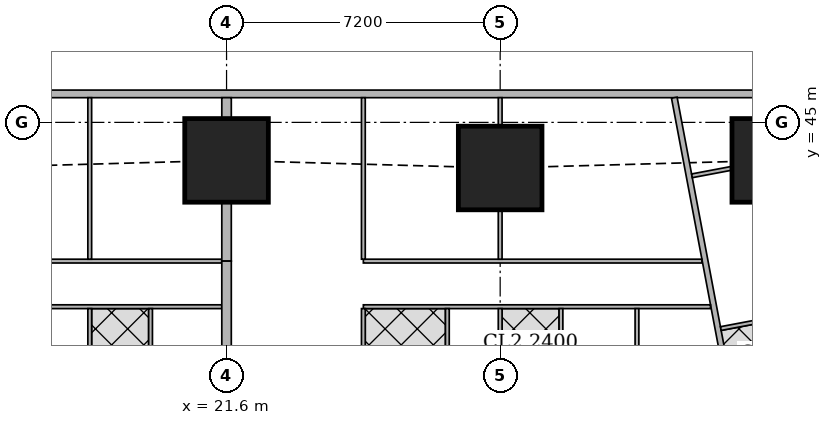
"""IFC4 building model, lengths in metres.
Left out: names, types, materials, properties, quantities, classifications, styles, units other than length and angle.
Written with IfcOpenShell. Run it as: python <this file> out.ifc"""

import sys

from ifc_helpers import new_model, si_unit, direction, frame, frame_2d, origin, origin_2d, place, context, subcontext, project, spatial, rectangle, extrude, element, fill, save


model = new_model("IFC4")
c1 = context("Model", 3, precision=1e-05, world=origin(), true_north=direction((0.0, 1.0)))
c2 = subcontext(c1, "Body", "Model", "MODEL_VIEW")
j1 = project(units=[si_unit("LENGTHUNIT", "METRE"), si_unit("PLANEANGLEUNIT", "RADIAN")], contexts=[c1])
p1 = place(None, origin())
s1 = spatial("IfcSite", under=j1, at=p1, CompositionType="ELEMENT")
p2 = place(p1, origin())
s2 = spatial("IfcBuilding", under=s1, at=p2, CompositionType="ELEMENT")
p3 = place(p2, frame((0.0, 0.0, 100.4)))
s3 = spatial("IfcBuildingStorey", under=s2, at=p3, CompositionType="ELEMENT", Elevation=100.4)
for number, where, z_axis, x_axis in (
    (1, (21.6, 44.0, 0.0), (0.0, 0.0, 1.0), (1.0, 0.0, 0.0)),
    (2, (28.8, 43.8, 0.0), (0.0, 0.0, 1.0), (1.0, 0.0, 0.0)),
    (3, (36.0, 44.0, 0.0), (0.0, 0.0, 1.0), (1.0, 0.0, 0.0)),
):
    element("IfcColumn", number, at=place(p3, frame(where, z_axis=z_axis, x_axis=x_axis)), inside=s3, PredefinedType="COLUMN", context=c2, shape_type="SweptSolid", body=[
        extrude(rectangle(XDim=2.2, YDim=2.2, at=origin_2d()), origin(), (0.0, 0.0, 1.0), 3.75),
    ])
p4 = place(p3, frame((40.106, 45.75, 0.0), z_axis=(0.0, 0.0, 1.0), x_axis=(-1.0, 0.0, 0.0)))
e4 = element("IfcWall", 4, at=p4, inside=s3, PredefinedType="SOLIDWALL", context=c2, shape_type="SweptSolid", body=[
    extrude(rectangle(XDim=37.943, YDim=0.2, at=frame_2d((18.971, 0.0))), origin(), (0.0, 0.0, 1.0), 3.5),
])
p5 = place(p4, frame((8.606, 0.0, 0.9)))
e5 = element("IfcOpeningElement", 5, at=p5, cuts=e4, PredefinedType="OPENING", context=c2, shape_type="SweptSolid", body=[
    extrude(rectangle(XDim=1.8, YDim=1.5, at=frame_2d((0.9, 0.75))), frame((0.0, 0.11, 0.0), z_axis=(0.0, -1.0, 0.0), x_axis=(1.0, 0.0, 0.0)), (0.0, 0.0, 1.0), 0.22),
])
p6 = place(p4, frame((12.206, 0.0, 0.9)))
e6 = element("IfcOpeningElement", 6, at=p6, cuts=e4, PredefinedType="OPENING", context=c2, shape_type="SweptSolid", body=[
    extrude(rectangle(XDim=1.8, YDim=1.5, at=frame_2d((0.9, 0.75))), frame((0.0, 0.11, 0.0), z_axis=(0.0, -1.0, 0.0), x_axis=(1.0, 0.0, 0.0)), (0.0, 0.0, 1.0), 0.22),
])
p7 = place(p4, frame((15.806, 0.0, 0.9)))
e7 = element("IfcOpeningElement", 7, at=p7, cuts=e4, PredefinedType="OPENING", context=c2, shape_type="SweptSolid", body=[
    extrude(rectangle(XDim=1.8, YDim=1.5, at=frame_2d((0.9, 0.75))), frame((0.0, 0.11, 0.0), z_axis=(0.0, -1.0, 0.0), x_axis=(1.0, 0.0, 0.0)), (0.0, 0.0, 1.0), 0.22),
])
p8 = place(p4, frame((19.406, 0.0, 0.9)))
e8 = element("IfcOpeningElement", 8, at=p8, cuts=e4, PredefinedType="OPENING", context=c2, shape_type="SweptSolid", body=[
    extrude(rectangle(XDim=1.8, YDim=1.5, at=frame_2d((0.9, 0.75))), frame((0.0, 0.11, 0.0), z_axis=(0.0, -1.0, 0.0), x_axis=(1.0, 0.0, 0.0)), (0.0, 0.0, 1.0), 0.22),
])
p9 = place(p4, frame((23.006, 0.0, 0.9)))
e9 = element("IfcOpeningElement", 9, at=p9, cuts=e4, PredefinedType="OPENING", context=c2, shape_type="SweptSolid", body=[
    extrude(rectangle(XDim=1.8, YDim=1.5, at=frame_2d((0.9, 0.75))), frame((0.0, 0.11, 0.0), z_axis=(0.0, -1.0, 0.0), x_axis=(1.0, 0.0, 0.0)), (0.0, 0.0, 1.0), 0.22),
])
p10 = place(p4, frame((26.606, 0.0, 0.9)))
e10 = element("IfcOpeningElement", 10, at=p10, cuts=e4, PredefinedType="OPENING", context=c2, shape_type="SweptSolid", body=[
    extrude(rectangle(XDim=1.8, YDim=1.5, at=frame_2d((0.9, 0.75))), frame((0.0, 0.11, 0.0), z_axis=(0.0, -1.0, 0.0), x_axis=(1.0, 0.0, 0.0)), (0.0, 0.0, 1.0), 0.22),
])
p11 = place(p3, frame((33.382, 45.65, 0.0), z_axis=(0.0, 0.0, 1.0), x_axis=(0.185593544777, -0.982626600565, 0.0)))
e11 = element("IfcWall", 11, at=p11, inside=s3, PredefinedType="SOLIDWALL", context=c2, shape_type="SweptSolid", body=[
    extrude(rectangle(XDim=47.118, YDim=0.15, at=frame_2d((23.559, 0.0))), origin(), (0.0, 0.0, 1.0), 2.2),
])
p12 = place(p11, frame((10.662, 0.0, 0.0)))
e12 = element("IfcOpeningElement", 12, at=p12, cuts=e11, PredefinedType="OPENING", context=c2, shape_type="SweptSolid", body=[
    extrude(rectangle(XDim=1.0, YDim=2.1, at=frame_2d((0.5, 1.05))), frame((0.0, 0.085, 0.0), z_axis=(0.0, -1.0, 0.0), x_axis=(1.0, 0.0, 0.0)), (0.0, 0.0, 1.0), 0.17),
])
p13 = place(p11, frame((15.237, 0.0, 0.0)))
e13 = element("IfcOpeningElement", 13, at=p13, cuts=e11, PredefinedType="OPENING", context=c2, shape_type="SweptSolid", body=[
    extrude(rectangle(XDim=1.0, YDim=2.1, at=frame_2d((0.5, 1.05))), frame((0.0, 0.085, 0.0), z_axis=(0.0, -1.0, 0.0), x_axis=(1.0, 0.0, 0.0)), (0.0, 0.0, 1.0), 0.17),
])
p14 = place(p11, frame((27.341, 0.0, 0.0)))
e14 = element("IfcOpeningElement", 14, at=p14, cuts=e11, PredefinedType="OPENING", context=c2, shape_type="SweptSolid", body=[
    extrude(rectangle(XDim=1.0, YDim=2.1, at=frame_2d((0.5, 1.05))), frame((0.0, 0.085, 0.0), z_axis=(0.0, -1.0, 0.0), x_axis=(1.0, 0.0, 0.0)), (0.0, 0.0, 1.0), 0.17),
])
p15 = place(p11, frame((33.833, 0.0, 0.0)))
e15 = element("IfcOpeningElement", 15, at=p15, cuts=e11, PredefinedType="OPENING", context=c2, shape_type="SweptSolid", body=[
    extrude(rectangle(XDim=1.0, YDim=2.1, at=frame_2d((0.5, 1.05))), frame((0.0, 0.085, 0.0), z_axis=(0.0, -1.0, 0.0), x_axis=(1.0, 0.0, 0.0)), (0.0, 0.0, 1.0), 0.17),
])
p16 = place(p3, frame((34.89, 43.791, 0.0), z_axis=(0.0, 0.0, 1.0), x_axis=(-0.982621304855, -0.185621580763, 0.0)))
e16 = element("IfcWall", 16, at=p16, inside=s3, PredefinedType="PARTITIONING", context=c2, shape_type="SweptSolid", body=[
    extrude(rectangle(XDim=1.062, YDim=0.1, at=frame_2d((0.531, 0.0))), origin(), (0.0, 0.0, 1.0), 2.05),
])
p17 = place(p3, frame((37.823, 40.182, 0.0), z_axis=(0.0, 0.0, 1.0), x_axis=(-0.982664729897, -0.18539155487, 0.0)))
e17 = element("IfcWall", 17, at=p17, inside=s3, PredefinedType="PARTITIONING", context=c2, shape_type="SweptSolid", body=[
    extrude(rectangle(XDim=3.274, YDim=0.1, at=frame_2d((1.637, 0.0))), origin(), (0.0, 0.0, 1.0), 3.5),
])
p18 = place(p3, frame((14.4, 41.35, 0.0), z_axis=(0.0, 0.0, 1.0), x_axis=(1.0, 0.0, 0.0)))
e18 = element("IfcWall", 18, at=p18, inside=s3, PredefinedType="PARTITIONING", context=c2, shape_type="SweptSolid", body=[
    extrude(rectangle(XDim=7.075, YDim=0.1, at=frame_2d((3.538, 0.0))), origin(), (0.0, 0.0, 1.0), 3.5),
])
p19 = place(p18, frame((0.2, 0.0, 0.0)))
e19 = element("IfcOpeningElement", 19, at=p19, cuts=e18, PredefinedType="OPENING", context=c2, shape_type="SweptSolid", body=[
    extrude(rectangle(XDim=0.9, YDim=2.1, at=frame_2d((0.45, 1.05))), frame((0.0, 0.06, 0.0), z_axis=(0.0, -1.0, 0.0), x_axis=(1.0, 0.0, 0.0)), (0.0, 0.0, 1.0), 0.12),
])
p20 = place(p18, frame((3.8, 0.0, 0.0)))
e20 = element("IfcOpeningElement", 20, at=p20, cuts=e18, PredefinedType="OPENING", context=c2, shape_type="SweptSolid", body=[
    extrude(rectangle(XDim=0.9, YDim=2.1, at=frame_2d((0.45, 1.05))), frame((0.0, 0.06, 0.0), z_axis=(0.0, -1.0, 0.0), x_axis=(1.0, 0.0, 0.0)), (0.0, 0.0, 1.0), 0.12),
])
p21 = place(p3, frame((14.4, 40.15, 0.0), z_axis=(0.0, 0.0, 1.0), x_axis=(1.0, 0.0, 0.0)))
e21 = element("IfcWall", 21, at=p21, inside=s3, PredefinedType="PARTITIONING", context=c2, shape_type="SweptSolid", body=[
    extrude(rectangle(XDim=7.075, YDim=0.1, at=frame_2d((3.538, 0.0))), origin(), (0.0, 0.0, 1.0), 3.5),
])
p22 = place(p21, frame((0.655, 0.0, 0.0)))
e22 = element("IfcOpeningElement", 22, at=p22, cuts=e21, PredefinedType="OPENING", context=c2, shape_type="SweptSolid", body=[
    extrude(rectangle(XDim=0.9, YDim=2.1, at=frame_2d((0.45, 1.05))), frame((0.0, 0.06, 0.0), z_axis=(0.0, -1.0, 0.0), x_axis=(1.0, 0.0, 0.0)), (0.0, 0.0, 1.0), 0.12),
])
p23 = place(p21, frame((3.95, 0.0, 0.0)))
e23 = element("IfcOpeningElement", 23, at=p23, cuts=e21, PredefinedType="OPENING", context=c2, shape_type="SweptSolid", body=[
    extrude(rectangle(XDim=0.9, YDim=2.1, at=frame_2d((0.45, 1.05))), frame((0.0, 0.06, 0.0), z_axis=(0.0, -1.0, 0.0), x_axis=(1.0, 0.0, 0.0)), (0.0, 0.0, 1.0), 0.12),
])
p24 = place(p21, frame((2.455, 0.0, 0.0)))
e24 = element("IfcOpeningElement", 24, at=p24, cuts=e21, PredefinedType="OPENING", context=c2, shape_type="SweptSolid", body=[
    extrude(rectangle(XDim=0.9, YDim=2.1, at=frame_2d((0.45, 1.05))), frame((0.0, 0.06, 0.0), z_axis=(0.0, -1.0, 0.0), x_axis=(1.0, 0.0, 0.0)), (0.0, 0.0, 1.0), 0.12),
])
p25 = place(p21, frame((5.75, 0.0, 0.0)))
e25 = element("IfcOpeningElement", 25, at=p25, cuts=e21, PredefinedType="OPENING", context=c2, shape_type="SweptSolid", body=[
    extrude(rectangle(XDim=0.9, YDim=2.1, at=frame_2d((0.45, 1.05))), frame((0.0, 0.06, 0.0), z_axis=(0.0, -1.0, 0.0), x_axis=(1.0, 0.0, 0.0)), (0.0, 0.0, 1.0), 0.12),
])
p26 = place(p3, frame((18.0, 41.4, 0.0), z_axis=(0.0, 0.0, 1.0), x_axis=(0.0, 1.0, 0.0)))
e26 = element("IfcWall", 26, at=p26, inside=s3, PredefinedType="PARTITIONING", context=c2, shape_type="SweptSolid", body=[
    extrude(rectangle(XDim=4.25, YDim=0.1, at=frame_2d((2.125, 0.0))), origin(), (0.0, 0.0, 1.0), 2.2),
])
for number, where, z_axis, x_axis in (
    (27, (18.0, 36.825, 0.0), (0.0, 0.0, 1.0), (0.0, 1.0, 0.0)),
    (28, (19.6, 36.825, 0.0), (0.0, 0.0, 1.0), (0.0, 1.0, 0.0)),
):
    element("IfcWall", number, at=place(p3, frame(where, z_axis=z_axis, x_axis=x_axis)), inside=s3, PredefinedType="PARTITIONING", context=c2, shape_type="SweptSolid", body=[
        extrude(rectangle(XDim=3.275, YDim=0.1, at=frame_2d((1.638, 0.0))), origin(), (0.0, 0.0, 1.0), 3.5),
    ])
p27 = place(p3, frame((25.2, 41.35, 0.0), z_axis=(0.0, 0.0, 1.0), x_axis=(1.0, 0.0, 0.0)))
e29 = element("IfcWall", 29, at=p27, inside=s3, PredefinedType="PARTITIONING", context=c2, shape_type="SweptSolid", body=[
    extrude(rectangle(XDim=8.908, YDim=0.1, at=frame_2d((4.454, 0.0))), origin(), (0.0, 0.0, 1.0), 3.5),
])
p28 = place(p27, frame((0.2, 0.0, 0.0)))
e30 = element("IfcOpeningElement", 30, at=p28, cuts=e29, PredefinedType="OPENING", context=c2, shape_type="SweptSolid", body=[
    extrude(rectangle(XDim=0.9, YDim=2.1, at=frame_2d((0.45, 1.05))), frame((0.0, 0.06, 0.0), z_axis=(0.0, -1.0, 0.0), x_axis=(1.0, 0.0, 0.0)), (0.0, 0.0, 1.0), 0.12),
])
p29 = place(p27, frame((3.8, 0.0, 0.0)))
e31 = element("IfcOpeningElement", 31, at=p29, cuts=e29, PredefinedType="OPENING", context=c2, shape_type="SweptSolid", body=[
    extrude(rectangle(XDim=0.9, YDim=2.1, at=frame_2d((0.45, 1.05))), frame((0.0, 0.06, 0.0), z_axis=(0.0, -1.0, 0.0), x_axis=(1.0, 0.0, 0.0)), (0.0, 0.0, 1.0), 0.12),
])
p30 = place(p3, frame((25.2, 40.15, 0.0), z_axis=(0.0, 0.0, 1.0), x_axis=(1.0, 0.0, 0.0)))
e32 = element("IfcWall", 32, at=p30, inside=s3, PredefinedType="PARTITIONING", context=c2, shape_type="SweptSolid", body=[
    extrude(rectangle(XDim=9.135, YDim=0.1, at=frame_2d((4.567, 0.0))), origin(), (0.0, 0.0, 1.0), 3.5),
])
p31 = place(p30, frame((0.655, 0.0, 0.0)))
e33 = element("IfcOpeningElement", 33, at=p31, cuts=e32, PredefinedType="OPENING", context=c2, shape_type="SweptSolid", body=[
    extrude(rectangle(XDim=0.9, YDim=2.1, at=frame_2d((0.45, 1.05))), frame((0.0, 0.06, 0.0), z_axis=(0.0, -1.0, 0.0), x_axis=(1.0, 0.0, 0.0)), (0.0, 0.0, 1.0), 0.12),
])
p32 = place(p30, frame((3.95, 0.0, 0.0)))
e34 = element("IfcOpeningElement", 34, at=p32, cuts=e32, PredefinedType="OPENING", context=c2, shape_type="SweptSolid", body=[
    extrude(rectangle(XDim=0.9, YDim=2.1, at=frame_2d((0.45, 1.05))), frame((0.0, 0.06, 0.0), z_axis=(0.0, -1.0, 0.0), x_axis=(1.0, 0.0, 0.0)), (0.0, 0.0, 1.0), 0.12),
])
p33 = place(p30, frame((8.081, 0.0, 0.0)))
e35 = element("IfcOpeningElement", 35, at=p33, cuts=e32, PredefinedType="OPENING", context=c2, shape_type="SweptSolid", body=[
    extrude(rectangle(XDim=0.9, YDim=2.1, at=frame_2d((0.45, 1.05))), frame((0.0, 0.06, 0.0), z_axis=(0.0, -1.0, 0.0), x_axis=(1.0, 0.0, 0.0)), (0.0, 0.0, 1.0), 0.12),
])
p34 = place(p30, frame((2.455, 0.0, 0.0)))
e36 = element("IfcOpeningElement", 36, at=p34, cuts=e32, PredefinedType="OPENING", context=c2, shape_type="SweptSolid", body=[
    extrude(rectangle(XDim=0.9, YDim=2.1, at=frame_2d((0.45, 1.05))), frame((0.0, 0.06, 0.0), z_axis=(0.0, -1.0, 0.0), x_axis=(1.0, 0.0, 0.0)), (0.0, 0.0, 1.0), 0.12),
])
p35 = place(p30, frame((5.75, 0.0, 0.0)))
e37 = element("IfcOpeningElement", 37, at=p35, cuts=e32, PredefinedType="OPENING", context=c2, shape_type="SweptSolid", body=[
    extrude(rectangle(XDim=0.9, YDim=2.1, at=frame_2d((0.45, 1.05))), frame((0.0, 0.06, 0.0), z_axis=(0.0, -1.0, 0.0), x_axis=(1.0, 0.0, 0.0)), (0.0, 0.0, 1.0), 0.12),
])
p36 = place(p3, frame((25.2, 41.4, 0.0), z_axis=(0.0, 0.0, 1.0), x_axis=(0.0, 1.0, 0.0)))
e38 = element("IfcWall", 38, at=p36, inside=s3, PredefinedType="PARTITIONING", context=c2, shape_type="SweptSolid", body=[
    extrude(rectangle(XDim=4.25, YDim=0.1, at=frame_2d((2.125, 0.0))), origin(), (0.0, 0.0, 1.0), 2.2),
])
p37 = place(p3, frame((28.8, 41.4, 0.0), z_axis=(0.0, 0.0, 1.0), x_axis=(0.0, 1.0, 0.0)))
e39 = element("IfcWall", 39, at=p37, inside=s3, PredefinedType="PARTITIONING", context=c2, shape_type="SweptSolid", body=[
    extrude(rectangle(XDim=1.299, YDim=0.1, at=frame_2d((0.649, 0.0))), origin(), (0.0, 0.0, 1.0), 3.5),
])
p38 = place(p3, frame((28.8, 44.901, 0.0), z_axis=(0.0, 0.0, 1.0), x_axis=(0.0, 1.0, 0.0)))
e40 = element("IfcWall", 40, at=p38, inside=s3, PredefinedType="PARTITIONING", context=c2, shape_type="SweptSolid", body=[
    extrude(rectangle(XDim=0.749, YDim=0.1, at=frame_2d((0.375, 0.0))), origin(), (0.0, 0.0, 1.0), 3.5),
])
p39 = place(p3, frame((25.2, 36.825, 0.0), z_axis=(0.0, 0.0, 1.0), x_axis=(0.0, 1.0, 0.0)))
e41 = element("IfcWall", 41, at=p39, inside=s3, PredefinedType="PARTITIONING", context=c2, shape_type="SweptSolid", body=[
    extrude(rectangle(XDim=3.275, YDim=0.1, at=frame_2d((1.638, 0.0))), origin(), (0.0, 0.0, 1.0), 3.5),
])
p40 = place(p3, frame((28.8, 38.301, 0.0), z_axis=(0.0, 0.0, 1.0), x_axis=(0.0, 1.0, 0.0)))
e42 = element("IfcWall", 42, at=p40, inside=s3, PredefinedType="PARTITIONING", context=c2, shape_type="SweptSolid", body=[
    extrude(rectangle(XDim=1.799, YDim=0.1, at=frame_2d((0.899, 0.0))), origin(), (0.0, 0.0, 1.0), 3.5),
])
for number, where, z_axis, x_axis in (
    (43, (32.4, 36.825, 0.0), (0.0, 0.0, 1.0), (0.0, 1.0, 0.0)),
    (44, (27.41, 36.825, 0.0), (0.0, 0.0, 1.0), (0.0, 1.0, 0.0)),
    (45, (30.4, 36.825, 0.0), (0.0, 0.0, 1.0), (0.0, 1.0, 0.0)),
):
    element("IfcWall", number, at=place(p3, frame(where, z_axis=z_axis, x_axis=x_axis)), inside=s3, PredefinedType="PARTITIONING", context=c2, shape_type="SweptSolid", body=[
        extrude(rectangle(XDim=3.275, YDim=0.1, at=frame_2d((1.638, 0.0))), origin(), (0.0, 0.0, 1.0), 3.5),
    ])
p41 = place(p3, frame((21.6, 41.35, 0.0), z_axis=(0.0, 0.0, 1.0), x_axis=(0.0, 1.0, 0.0)))
e46 = element("IfcWall", 46, at=p41, inside=s3, PredefinedType="SOLIDWALL", context=c2, shape_type="SweptSolid", body=[
    extrude(rectangle(XDim=1.549, YDim=0.25, at=frame_2d((0.774, 0.0))), origin(), (0.0, 0.0, 1.0), 3.5),
])
p42 = place(p3, frame((21.6, 45.101, 0.0), z_axis=(0.0, 0.0, 1.0), x_axis=(0.0, 1.0, 0.0)))
e47 = element("IfcWall", 47, at=p42, inside=s3, PredefinedType="SOLIDWALL", context=c2, shape_type="SweptSolid", body=[
    extrude(rectangle(XDim=0.549, YDim=0.25, at=frame_2d((0.274, 0.0))), origin(), (0.0, 0.0, 1.0), 3.5),
])
p43 = place(p3, frame((21.6, 38.301, 0.0), z_axis=(0.0, 0.0, 1.0), x_axis=(0.0, 1.0, 0.0)))
e48 = element("IfcWall", 48, at=p43, inside=s3, PredefinedType="SOLIDWALL", context=c2, shape_type="SweptSolid", body=[
    extrude(rectangle(XDim=3.049, YDim=0.25, at=frame_2d((1.524, 0.0))), origin(), (0.0, 0.0, 1.0), 3.5),
])
p44 = place(p5, origin())
e49 = element("IfcWindow", 49, at=p44, inside=s3, PartitioningType="SINGLE_PANEL", PredefinedType="WINDOW", context=c2, shape_type="SweptSolid", body=[
    extrude(rectangle(XDim=1.8, YDim=1.5, at=frame_2d((0.9, 0.75))), frame((0.0, 0.03, 0.0), z_axis=(0.0, -1.0, 0.0), x_axis=(1.0, 0.0, 0.0)), (0.0, 0.0, 1.0), 0.06),
])
fill(e5, e49)
p45 = place(p6, origin())
e50 = element("IfcWindow", 50, at=p45, inside=s3, PartitioningType="SINGLE_PANEL", PredefinedType="WINDOW", context=c2, shape_type="SweptSolid", body=[
    extrude(rectangle(XDim=1.8, YDim=1.5, at=frame_2d((0.9, 0.75))), frame((0.0, 0.03, 0.0), z_axis=(0.0, -1.0, 0.0), x_axis=(1.0, 0.0, 0.0)), (0.0, 0.0, 1.0), 0.06),
])
fill(e6, e50)
p46 = place(p7, origin())
e51 = element("IfcWindow", 51, at=p46, inside=s3, PartitioningType="SINGLE_PANEL", PredefinedType="WINDOW", context=c2, shape_type="SweptSolid", body=[
    extrude(rectangle(XDim=1.8, YDim=1.5, at=frame_2d((0.9, 0.75))), frame((0.0, 0.03, 0.0), z_axis=(0.0, -1.0, 0.0), x_axis=(1.0, 0.0, 0.0)), (0.0, 0.0, 1.0), 0.06),
])
fill(e7, e51)
p47 = place(p8, origin())
e52 = element("IfcWindow", 52, at=p47, inside=s3, PartitioningType="SINGLE_PANEL", PredefinedType="WINDOW", context=c2, shape_type="SweptSolid", body=[
    extrude(rectangle(XDim=1.8, YDim=1.5, at=frame_2d((0.9, 0.75))), frame((0.0, 0.03, 0.0), z_axis=(0.0, -1.0, 0.0), x_axis=(1.0, 0.0, 0.0)), (0.0, 0.0, 1.0), 0.06),
])
fill(e8, e52)
p48 = place(p9, origin())
e53 = element("IfcWindow", 53, at=p48, inside=s3, PartitioningType="SINGLE_PANEL", PredefinedType="WINDOW", context=c2, shape_type="SweptSolid", body=[
    extrude(rectangle(XDim=1.8, YDim=1.5, at=frame_2d((0.9, 0.75))), frame((0.0, 0.03, 0.0), z_axis=(0.0, -1.0, 0.0), x_axis=(1.0, 0.0, 0.0)), (0.0, 0.0, 1.0), 0.06),
])
fill(e9, e53)
p49 = place(p20, origin())
e54 = element("IfcDoor", 54, at=p49, inside=s3, OperationType="SINGLE_SWING_LEFT", PredefinedType="DOOR", context=c2, shape_type="SweptSolid", body=[
    extrude(rectangle(XDim=0.9, YDim=2.1, at=frame_2d((0.45, 1.05))), frame((0.0, 0.025, 0.0), z_axis=(0.0, -1.0, 0.0), x_axis=(1.0, 0.0, 0.0)), (0.0, 0.0, 1.0), 0.05),
])
fill(e20, e54)
p50 = place(p23, origin())
e55 = element("IfcDoor", 55, at=p50, inside=s3, OperationType="SINGLE_SWING_LEFT", PredefinedType="DOOR", context=c2, shape_type="SweptSolid", body=[
    extrude(rectangle(XDim=0.9, YDim=2.1, at=frame_2d((0.45, 1.05))), frame((0.0, 0.025, 0.0), z_axis=(0.0, -1.0, 0.0), x_axis=(1.0, 0.0, 0.0)), (0.0, 0.0, 1.0), 0.05),
])
fill(e23, e55)
p51 = place(p24, origin())
e56 = element("IfcDoor", 56, at=p51, inside=s3, OperationType="SINGLE_SWING_LEFT", PredefinedType="DOOR", context=c2, shape_type="SweptSolid", body=[
    extrude(rectangle(XDim=0.9, YDim=2.1, at=frame_2d((0.45, 1.05))), frame((0.0, 0.025, 0.0), z_axis=(0.0, -1.0, 0.0), x_axis=(1.0, 0.0, 0.0)), (0.0, 0.0, 1.0), 0.05),
])
fill(e24, e56)
p52 = place(p25, origin())
e57 = element("IfcDoor", 57, at=p52, inside=s3, OperationType="SINGLE_SWING_LEFT", PredefinedType="DOOR", context=c2, shape_type="SweptSolid", body=[
    extrude(rectangle(XDim=0.9, YDim=2.1, at=frame_2d((0.45, 1.05))), frame((0.0, 0.025, 0.0), z_axis=(0.0, -1.0, 0.0), x_axis=(1.0, 0.0, 0.0)), (0.0, 0.0, 1.0), 0.05),
])
fill(e25, e57)
p53 = place(p28, origin())
e58 = element("IfcDoor", 58, at=p53, inside=s3, OperationType="SINGLE_SWING_LEFT", PredefinedType="DOOR", context=c2, shape_type="SweptSolid", body=[
    extrude(rectangle(XDim=0.9, YDim=2.1, at=frame_2d((0.45, 1.05))), frame((0.0, 0.025, 0.0), z_axis=(0.0, -1.0, 0.0), x_axis=(1.0, 0.0, 0.0)), (0.0, 0.0, 1.0), 0.05),
])
fill(e30, e58)
p54 = place(p29, origin())
e59 = element("IfcDoor", 59, at=p54, inside=s3, OperationType="SINGLE_SWING_RIGHT", PredefinedType="DOOR", context=c2, shape_type="SweptSolid", body=[
    extrude(rectangle(XDim=0.9, YDim=2.1, at=frame_2d((0.45, 1.05))), frame((0.0, 0.025, 0.0), z_axis=(0.0, -1.0, 0.0), x_axis=(1.0, 0.0, 0.0)), (0.0, 0.0, 1.0), 0.05),
])
fill(e31, e59)
p55 = place(p31, origin())
e60 = element("IfcDoor", 60, at=p55, inside=s3, OperationType="SINGLE_SWING_RIGHT", PredefinedType="DOOR", context=c2, shape_type="SweptSolid", body=[
    extrude(rectangle(XDim=0.9, YDim=2.1, at=frame_2d((0.45, 1.05))), frame((0.0, 0.025, 0.0), z_axis=(0.0, -1.0, 0.0), x_axis=(1.0, 0.0, 0.0)), (0.0, 0.0, 1.0), 0.05),
])
fill(e33, e60)
p56 = place(p32, origin())
e61 = element("IfcDoor", 61, at=p56, inside=s3, OperationType="SINGLE_SWING_RIGHT", PredefinedType="DOOR", context=c2, shape_type="SweptSolid", body=[
    extrude(rectangle(XDim=0.9, YDim=2.1, at=frame_2d((0.45, 1.05))), frame((0.0, 0.025, 0.0), z_axis=(0.0, -1.0, 0.0), x_axis=(1.0, 0.0, 0.0)), (0.0, 0.0, 1.0), 0.05),
])
fill(e34, e61)
p57 = place(p33, origin())
e62 = element("IfcDoor", 62, at=p57, inside=s3, OperationType="SINGLE_SWING_LEFT", PredefinedType="DOOR", context=c2, shape_type="SweptSolid", body=[
    extrude(rectangle(XDim=0.9, YDim=2.1, at=frame_2d((0.45, 1.05))), frame((0.0, 0.025, 0.0), z_axis=(0.0, -1.0, 0.0), x_axis=(1.0, 0.0, 0.0)), (0.0, 0.0, 1.0), 0.05),
])
fill(e35, e62)
p58 = place(p34, origin())
e63 = element("IfcDoor", 63, at=p58, inside=s3, OperationType="SINGLE_SWING_LEFT", PredefinedType="DOOR", context=c2, shape_type="SweptSolid", body=[
    extrude(rectangle(XDim=0.9, YDim=2.1, at=frame_2d((0.45, 1.05))), frame((0.0, 0.025, 0.0), z_axis=(0.0, -1.0, 0.0), x_axis=(1.0, 0.0, 0.0)), (0.0, 0.0, 1.0), 0.05),
])
fill(e36, e63)
p59 = place(p35, origin())
e64 = element("IfcDoor", 64, at=p59, inside=s3, OperationType="SINGLE_SWING_LEFT", PredefinedType="DOOR", context=c2, shape_type="SweptSolid", body=[
    extrude(rectangle(XDim=0.9, YDim=2.1, at=frame_2d((0.45, 1.05))), frame((0.0, 0.025, 0.0), z_axis=(0.0, -1.0, 0.0), x_axis=(1.0, 0.0, 0.0)), (0.0, 0.0, 1.0), 0.05),
])
fill(e37, e64)
save(model, sys.argv[1])
